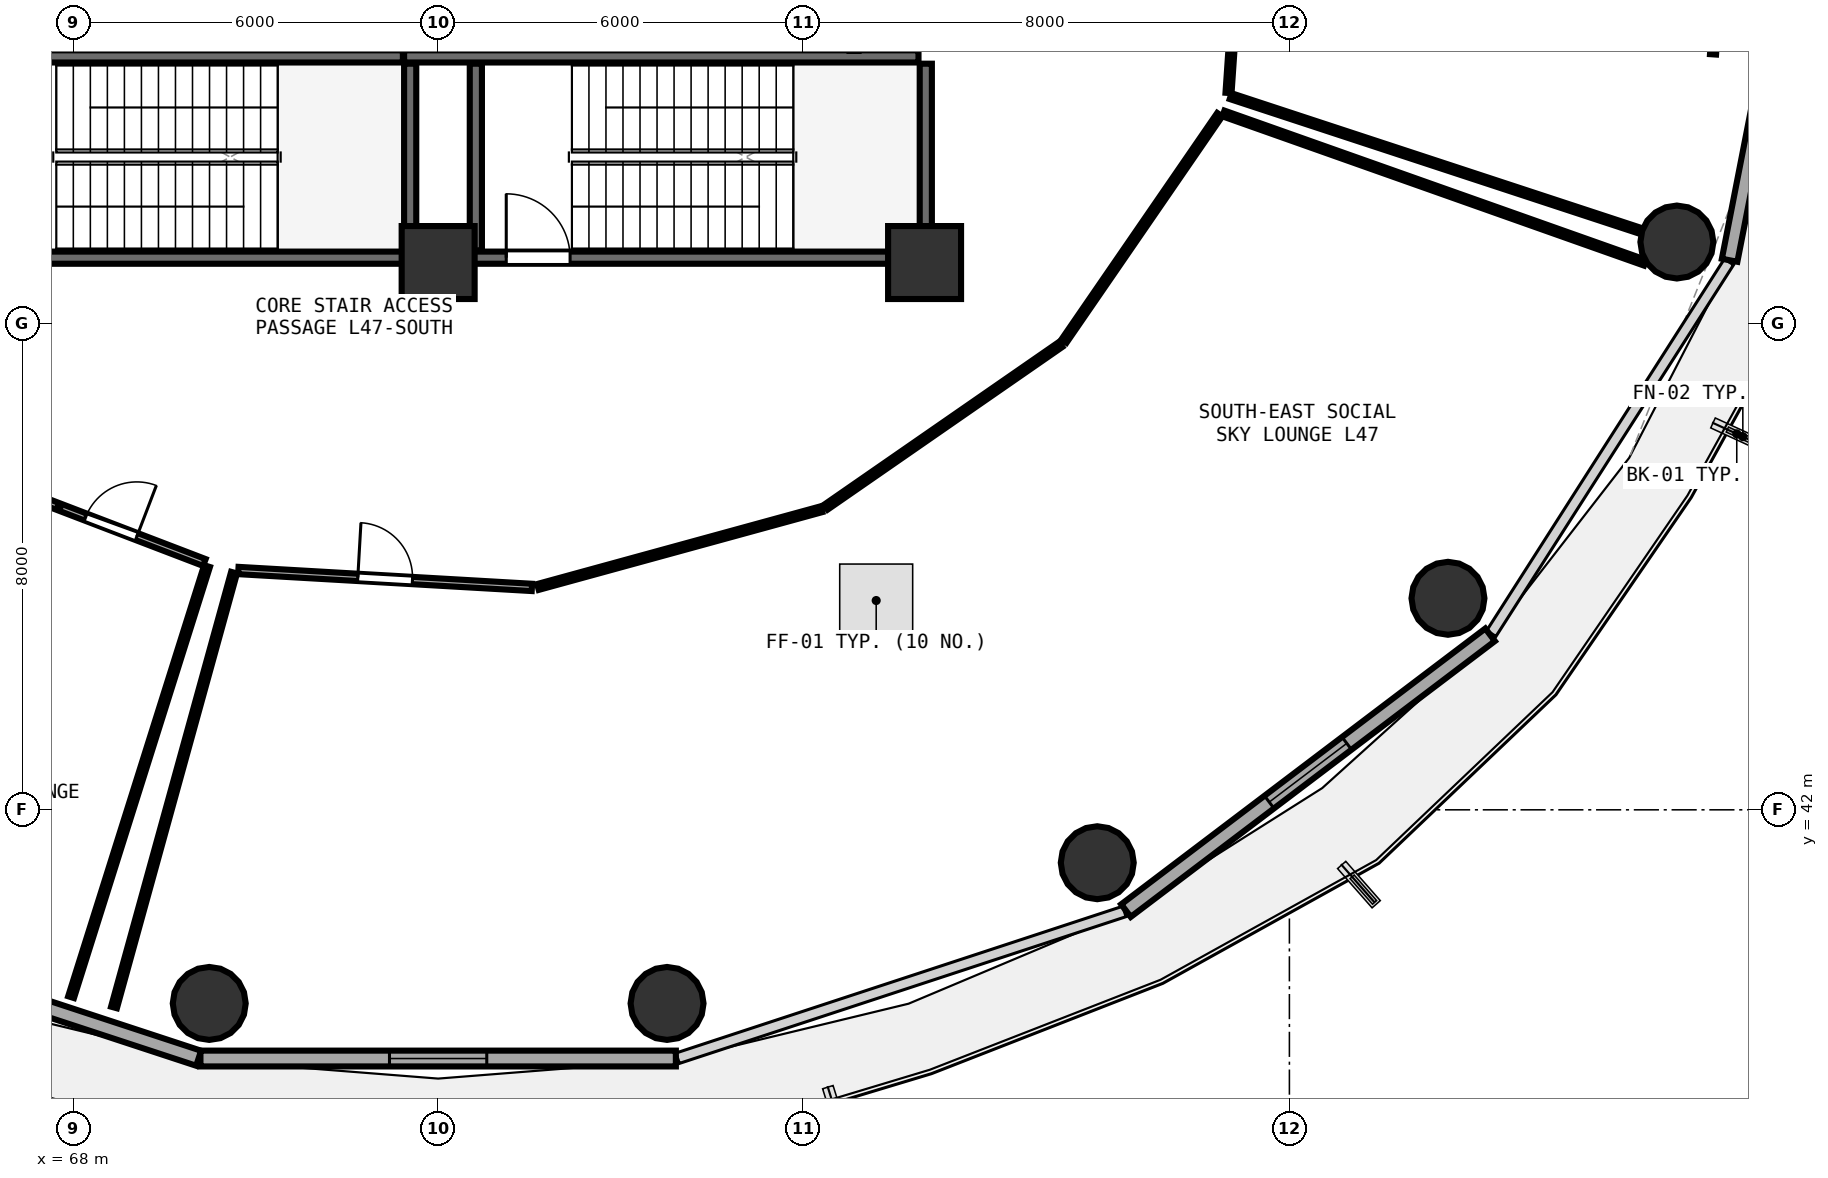
"""IFC4 building model, lengths in metres.
Left out: names, types, materials, properties, quantities, classifications, styles, units other than length and angle.
Written with IfcOpenShell. Run it as: python <this file> out.ifc"""

import sys

from ifc_helpers import new_model, si_unit, direction, frame, frame_2d, origin, origin_2d, place, context, subcontext, project, spatial, rectangle, circle, extrude, element, fill, save


model = new_model("IFC4")
c1 = context("Model", 3, precision=1e-05, world=origin(), true_north=direction((0.0, 1.0)))
c2 = subcontext(c1, "Body", "Model", "MODEL_VIEW")
j1 = project(units=[si_unit("LENGTHUNIT", "METRE"), si_unit("PLANEANGLEUNIT", "RADIAN")], contexts=[c1])
p1 = place(None, origin())
s1 = spatial("IfcSite", under=j1, at=p1, CompositionType="ELEMENT")
p2 = place(p1, origin())
s2 = spatial("IfcBuilding", under=s1, at=p2, CompositionType="ELEMENT")
p3 = place(p2, frame((0.0, 0.0, 184.35)))
s3 = spatial("IfcBuildingStorey", under=s2, at=p3, CompositionType="ELEMENT", Elevation=184.35)
for number, where, z_axis, x_axis in (
    (1, (74.0, 51.0, 0.0), (0.0, 0.0, 1.0), (1.0, 0.0, 0.0)),
    (2, (82.0, 51.0, 0.0), (0.0, 0.0, 1.0), (1.0, 0.0, 0.0)),
):
    element("IfcColumn", number, at=place(p3, frame(where, z_axis=z_axis, x_axis=x_axis)), inside=s3, PredefinedType="PILASTER", context=c2, shape_type="SweptSolid", body=[
        extrude(rectangle(XDim=1.2, YDim=1.2, at=origin_2d()), origin(), (0.0, 0.0, 1.0), 4.76),
    ])
for number, where, z_axis, x_axis in (
    (3, (70.235, 38.816, 0.0), (0.0, 0.0, 1.0), (1.0, 0.0, 0.0)),
    (4, (77.765, 38.816, 0.0), (0.0, 0.0, 1.0), (1.0, 0.0, 0.0)),
    (5, (84.84, 41.13, 0.0), (0.0, 0.0, 1.0), (1.0, 0.0, 0.0)),
    (6, (90.608, 45.479, 0.0), (0.0, 0.0, 1.0), (1.0, 0.0, 0.0)),
    (7, (94.373, 51.337, 0.0), (0.0, 0.0, 1.0), (1.0, 0.0, 0.0)),
):
    element("IfcColumn", number, at=place(p3, frame(where, z_axis=z_axis, x_axis=x_axis)), inside=s3, PredefinedType="COLUMN", context=c2, shape_type="SweptSolid", body=[
        extrude(circle(Radius=0.6, at=origin_2d()), origin(), (0.0, 0.0, 1.0), 4.76),
    ])
p4 = place(p3, frame((62.714, 40.328, 0.0), z_axis=(0.0, 0.0, 1.0), x_axis=(0.950038302428, -0.312133343173, 0.0)))
e8 = element("IfcWall", 8, at=p4, inside=s3, PredefinedType="SOLIDWALL", context=c2, shape_type="SweptSolid", body=[
    extrude(rectangle(XDim=7.733, YDim=0.26, at=frame_2d((3.867, 0.0))), origin(), (0.0, 0.0, 1.0), 4.345),
])
p5 = place(p4, frame((3.067, 0.0, 0.85)))
e9 = element("IfcOpeningElement", 9, at=p5, cuts=e8, PredefinedType="OPENING", context=c2, shape_type="SweptSolid", body=[
    extrude(rectangle(XDim=1.6, YDim=1.45, at=frame_2d((0.8, 0.725))), frame((0.0, 0.14, 0.0), z_axis=(0.0, -1.0, 0.0), x_axis=(1.0, 0.0, 0.0)), (0.0, 0.0, 1.0), 0.28),
])
p6 = place(p3, frame((70.091, 37.91, 0.0), z_axis=(0.0, 0.0, 1.0), x_axis=(1.0, 0.0, 0.0)))
e10 = element("IfcWall", 10, at=p6, inside=s3, PredefinedType="SOLIDWALL", context=c2, shape_type="SweptSolid", body=[
    extrude(rectangle(XDim=7.819, YDim=0.26, at=frame_2d((3.909, 0.0))), origin(), (0.0, 0.0, 1.0), 4.345),
])
p7 = place(p6, frame((3.109, 0.0, 0.85)))
e11 = element("IfcOpeningElement", 11, at=p7, cuts=e10, PredefinedType="OPENING", context=c2, shape_type="SweptSolid", body=[
    extrude(rectangle(XDim=1.6, YDim=1.45, at=frame_2d((0.8, 0.725))), frame((0.0, 0.14, 0.0), z_axis=(0.0, -1.0, 0.0), x_axis=(1.0, 0.0, 0.0)), (0.0, 0.0, 1.0), 0.28),
])
p8 = place(p3, frame((85.312, 40.342, 0.0), z_axis=(0.0, 0.0, 1.0), x_axis=(0.797163719609, 0.603763202042, 0.0)))
e12 = element("IfcWall", 12, at=p8, inside=s3, PredefinedType="SOLIDWALL", context=c2, shape_type="SweptSolid", body=[
    extrude(rectangle(XDim=7.512, YDim=0.26, at=frame_2d((3.756, 0.0))), origin(), (0.0, 0.0, 1.0), 4.345),
])
p9 = place(p8, frame((2.956, 0.0, 0.85)))
e13 = element("IfcOpeningElement", 13, at=p9, cuts=e12, PredefinedType="OPENING", context=c2, shape_type="SweptSolid", body=[
    extrude(rectangle(XDim=1.6, YDim=1.45, at=frame_2d((0.8, 0.725))), frame((0.0, 0.14, 0.0), z_axis=(0.0, -1.0, 0.0), x_axis=(1.0, 0.0, 0.0)), (0.0, 0.0, 1.0), 0.28),
])
p10 = place(p3, frame((95.24, 51.038, 0.0), z_axis=(0.0, 0.0, 1.0), x_axis=(0.191716984769, 0.981450252306, 0.0)))
e14 = element("IfcWall", 14, at=p10, inside=s3, PredefinedType="SOLIDWALL", context=c2, shape_type="SweptSolid", body=[
    extrude(rectangle(XDim=7.079, YDim=0.26, at=frame_2d((3.54, 0.0))), origin(), (0.0, 0.0, 1.0), 4.345),
])
p11 = place(p10, frame((2.74, 0.0, 0.85)))
e15 = element("IfcOpeningElement", 15, at=p11, cuts=e14, PredefinedType="OPENING", context=c2, shape_type="SweptSolid", body=[
    extrude(rectangle(XDim=1.6, YDim=1.45, at=frame_2d((0.8, 0.725))), frame((0.0, 0.14, 0.0), z_axis=(0.0, -1.0, 0.0), x_axis=(1.0, 0.0, 0.0)), (0.0, 0.0, 1.0), 0.28),
])
p12 = place(p3, frame((74.0, 51.08, 0.0), z_axis=(0.0, 0.0, 1.0), x_axis=(1.0, 0.0, 0.0)))
e16 = element("IfcWall", 16, at=p12, inside=s3, PredefinedType="SHEAR", context=c2, shape_type="SweptSolid", body=[
    extrude(rectangle(XDim=7.9, YDim=0.2, at=frame_2d((3.95, 0.0))), origin(), (0.0, 0.0, 1.0), 4.36),
])
p13 = place(p12, frame((1.12, 0.0, 0.0)))
e17 = element("IfcOpeningElement", 17, at=p13, cuts=e16, PredefinedType="OPENING", context=c2, shape_type="SweptSolid", body=[
    extrude(rectangle(XDim=1.05, YDim=2.1, at=frame_2d((0.525, 1.05))), frame((0.0, 0.11, 0.0), z_axis=(0.0, -1.0, 0.0), x_axis=(1.0, 0.0, 0.0)), (0.0, 0.0, 1.0), 0.22),
])
p14 = place(p3, frame((82.02, 51.2, 0.0), z_axis=(0.0, 0.0, 1.0), x_axis=(0.0, 1.0, 0.0)))
e18 = element("IfcWall", 18, at=p14, inside=s3, PredefinedType="SHEAR", context=c2, shape_type="SweptSolid", body=[
    extrude(rectangle(XDim=3.07, YDim=0.2, at=frame_2d((1.535, 0.0))), origin(), (0.0, 0.0, 1.0), 4.36),
])
p15 = place(p3, frame((81.9, 54.39, 0.0), z_axis=(0.0, 0.0, 1.0), x_axis=(-1.0, 0.0, 0.0)))
e19 = element("IfcWall", 19, at=p15, inside=s3, PredefinedType="SHEAR", context=c2, shape_type="SweptSolid", body=[
    extrude(rectangle(XDim=8.46, YDim=0.2, at=frame_2d((4.23, 0.0))), origin(), (0.0, 0.0, 1.0), 4.36),
])
p16 = place(p3, frame((74.62, 54.27, 0.0), z_axis=(0.0, 0.0, 1.0), x_axis=(0.0, -1.0, 0.0)))
e20 = element("IfcWall", 20, at=p16, inside=s3, PredefinedType="SHEAR", context=c2, shape_type="SweptSolid", body=[
    extrude(rectangle(XDim=3.07, YDim=0.2, at=frame_2d((1.535, 0.0))), origin(), (0.0, 0.0, 1.0), 4.36),
])
p17 = place(p3, frame((66.26, 51.08, 0.0), z_axis=(0.0, 0.0, 1.0), x_axis=(1.0, 0.0, 0.0)))
e21 = element("IfcWall", 21, at=p17, inside=s3, PredefinedType="SHEAR", context=c2, shape_type="SweptSolid", body=[
    extrude(rectangle(XDim=7.16, YDim=0.2, at=frame_2d((3.58, 0.0))), origin(), (0.0, 0.0, 1.0), 4.36),
])
p18 = place(p3, frame((73.54, 51.2, 0.0), z_axis=(0.0, 0.0, 1.0), x_axis=(0.0, 1.0, 0.0)))
e22 = element("IfcWall", 22, at=p18, inside=s3, PredefinedType="SHEAR", context=c2, shape_type="SweptSolid", body=[
    extrude(rectangle(XDim=3.07, YDim=0.2, at=frame_2d((1.535, 0.0))), origin(), (0.0, 0.0, 1.0), 4.36),
])
p19 = place(p3, frame((73.42, 54.39, 0.0), z_axis=(0.0, 0.0, 1.0), x_axis=(-1.0, 0.0, 0.0)))
e23 = element("IfcWall", 23, at=p19, inside=s3, PredefinedType="SHEAR", context=c2, shape_type="SweptSolid", body=[
    extrude(rectangle(XDim=7.16, YDim=0.2, at=frame_2d((3.58, 0.0))), origin(), (0.0, 0.0, 1.0), 4.36),
])
p20 = place(p3, frame((70.714, 45.936, 0.0), z_axis=(0.0, 0.0, 1.0), x_axis=(0.998345519296, -0.057499774802, 0.0)))
e24 = element("IfcWall", 24, at=p20, inside=s3, PredefinedType="PARTITIONING", context=c2, shape_type="SweptSolid", body=[
    extrude(rectangle(XDim=4.836, YDim=0.12, at=frame_2d((2.418, 0.0))), origin(), (0.0, 0.0, 1.0), 2.345),
])
p21 = place(p20, frame((1.968, 0.0, 0.0)))
e25 = element("IfcOpeningElement", 25, at=p21, cuts=e24, PredefinedType="OPENING", context=c2, shape_type="SweptSolid", body=[
    extrude(rectangle(XDim=0.9, YDim=2.08, at=frame_2d((0.45, 1.04))), frame((0.0, 0.07, 0.0), z_axis=(0.0, -1.0, 0.0), x_axis=(1.0, 0.0, 0.0)), (0.0, 0.0, 1.0), 0.14),
])
p22 = place(p3, frame((67.092, 47.24, 0.0), z_axis=(0.0, 0.0, 1.0), x_axis=(0.93395246748, -0.35739724186, 0.0)))
e26 = element("IfcWall", 26, at=p22, inside=s3, PredefinedType="PARTITIONING", context=c2, shape_type="SweptSolid", body=[
    extrude(rectangle(XDim=3.28, YDim=0.12, at=frame_2d((1.64, 0.0))), origin(), (0.0, 0.0, 1.0), 4.105),
])
p23 = place(p22, frame((1.19, 0.0, 0.0)))
e27 = element("IfcOpeningElement", 27, at=p23, cuts=e26, PredefinedType="OPENING", context=c2, shape_type="SweptSolid", body=[
    extrude(rectangle(XDim=0.9, YDim=2.08, at=frame_2d((0.45, 1.04))), frame((0.0, 0.07, 0.0), z_axis=(0.0, -1.0, 0.0), x_axis=(1.0, 0.0, 0.0)), (0.0, 0.0, 1.0), 0.14),
])
p24 = place(p3, frame((75.641, 45.665, 0.0), z_axis=(0.0, 0.0, 1.0), x_axis=(0.964402925862, 0.264437131637, 0.0)))
e28 = element("IfcWall", 28, at=p24, inside=s3, PredefinedType="PARTITIONING", context=c2, shape_type="SweptSolid", body=[
    extrude(rectangle(XDim=4.836, YDim=0.1, at=frame_2d((2.418, 0.0))), origin(), (0.0, 0.0, 1.0), 2.345),
])
p25 = place(p3, frame((80.376, 46.977, 0.0), z_axis=(0.0, 0.0, 1.0), x_axis=(0.821969471946, 0.569531550653, 0.0)))
e29 = element("IfcWall", 29, at=p25, inside=s3, PredefinedType="PARTITIONING", context=c2, shape_type="SweptSolid", body=[
    extrude(rectangle(XDim=4.697, YDim=0.1, at=frame_2d((2.349, 0.0))), origin(), (0.0, 0.0, 1.0), 2.345),
])
p26 = place(p3, frame((84.293, 49.708, 0.0), z_axis=(0.0, 0.0, 1.0), x_axis=(0.566732833033, 0.823901630028, 0.0)))
e30 = element("IfcWall", 30, at=p26, inside=s3, PredefinedType="PARTITIONING", context=c2, shape_type="SweptSolid", body=[
    extrude(rectangle(XDim=4.52, YDim=0.1, at=frame_2d((2.26, 0.0))), origin(), (0.0, 0.0, 1.0), 2.345),
])
p27 = place(p3, frame((86.915, 53.452, 0.0), z_axis=(0.0, 0.0, 1.0), x_axis=(0.942679225918, -0.333700280226, 0.0)))
e31 = element("IfcWall", 31, at=p27, inside=s3, PredefinedType="PARTITIONING", context=c2, shape_type="SweptSolid", body=[
    extrude(rectangle(XDim=7.355, YDim=0.1, at=frame_2d((3.677, 0.0))), origin(), (0.0, 0.0, 1.0), 2.345),
])
p28 = place(p3, frame((68.669, 38.75, 0.0), z_axis=(0.0, 0.0, 1.0), x_axis=(0.26617364863, 0.963925095002, 0.0)))
e32 = element("IfcWall", 32, at=p28, inside=s3, PredefinedType="PARTITIONING", context=c2, shape_type="SweptSolid", body=[
    extrude(rectangle(XDim=7.418, YDim=0.1, at=frame_2d((3.709, 0.0))), origin(), (0.0, 0.0, 1.0), 3.895),
])
p29 = place(p3, frame((86.999, 53.789, 0.0), z_axis=(0.0, 0.0, 1.0), x_axis=(0.06796220027, 0.997687896757, 0.0)))
e33 = element("IfcWall", 33, at=p29, inside=s3, PredefinedType="PARTITIONING", context=c2, shape_type="SweptSolid", body=[
    extrude(rectangle(XDim=6.983, YDim=0.1, at=frame_2d((3.492, 0.0))), origin(), (0.0, 0.0, 1.0), 2.345),
])
p30 = place(p3, frame((95.184, 57.619, 0.0), z_axis=(0.0, 0.0, 1.0), x_axis=(-0.06775835494, -0.997701761718, 0.0)))
e34 = element("IfcWall", 34, at=p30, inside=s3, PredefinedType="PARTITIONING", context=c2, shape_type="SweptSolid", body=[
    extrude(rectangle(XDim=3.203, YDim=0.1, at=frame_2d((1.602, 0.0))), origin(), (0.0, 0.0, 1.0), 2.345),
])
p31 = place(p3, frame((93.775, 51.521, 0.0), z_axis=(0.0, 0.0, 1.0), x_axis=(-0.949992823036, 0.312271734521, 0.0)))
e35 = element("IfcWall", 35, at=p31, inside=s3, PredefinedType="PARTITIONING", context=c2, shape_type="SweptSolid", body=[
    extrude(rectangle(XDim=7.096, YDim=0.1, at=frame_2d((3.548, 0.0))), origin(), (0.0, 0.0, 1.0), 2.345),
])
p32 = place(p3, frame((70.199, 46.008, 0.0), z_axis=(0.0, 0.0, 1.0), x_axis=(-0.300834252316, -0.953676440222, 0.0)))
e36 = element("IfcWall", 36, at=p32, inside=s3, PredefinedType="PARTITIONING", context=c2, shape_type="SweptSolid", body=[
    extrude(rectangle(XDim=7.433, YDim=0.1, at=frame_2d((3.716, 0.0))), origin(), (0.0, 0.0, 1.0), 3.895),
])
p33 = place(p7, origin())
e37 = element("IfcWindow", 37, at=p33, inside=s3, PartitioningType="SINGLE_PANEL", PredefinedType="WINDOW", context=c2, shape_type="SweptSolid", body=[
    extrude(rectangle(XDim=1.6, YDim=1.45, at=frame_2d((0.8, 0.725))), frame((0.0, 0.03, 0.0), z_axis=(0.0, -1.0, 0.0), x_axis=(1.0, 0.0, 0.0)), (0.0, 0.0, 1.0), 0.06),
])
fill(e11, e37)
p34 = place(p9, origin())
e38 = element("IfcWindow", 38, at=p34, inside=s3, PartitioningType="SINGLE_PANEL", PredefinedType="WINDOW", context=c2, shape_type="SweptSolid", body=[
    extrude(rectangle(XDim=1.6, YDim=1.45, at=frame_2d((0.8, 0.725))), frame((0.0, 0.03, 0.0), z_axis=(0.0, -1.0, 0.0), x_axis=(1.0, 0.0, 0.0)), (0.0, 0.0, 1.0), 0.06),
])
fill(e13, e38)
p35 = place(p13, origin())
e39 = element("IfcDoor", 39, at=p35, inside=s3, OperationType="SINGLE_SWING_LEFT", PredefinedType="DOOR", context=c2, shape_type="SweptSolid", body=[
    extrude(rectangle(XDim=1.05, YDim=2.1, at=frame_2d((0.525, 1.05))), frame((0.0, 0.025, 0.0), z_axis=(0.0, -1.0, 0.0), x_axis=(1.0, 0.0, 0.0)), (0.0, 0.0, 1.0), 0.05),
])
fill(e17, e39)
p36 = place(p21, origin())
e40 = element("IfcDoor", 40, at=p36, inside=s3, OperationType="SINGLE_SWING_LEFT", PredefinedType="DOOR", context=c2, shape_type="SweptSolid", body=[
    extrude(rectangle(XDim=0.9, YDim=2.08, at=frame_2d((0.45, 1.04))), frame((0.0, 0.025, 0.0), z_axis=(0.0, -1.0, 0.0), x_axis=(1.0, 0.0, 0.0)), (0.0, 0.0, 1.0), 0.05),
])
fill(e25, e40)
p37 = place(p23, origin())
e41 = element("IfcDoor", 41, at=p37, inside=s3, OperationType="SINGLE_SWING_RIGHT", PredefinedType="DOOR", context=c2, shape_type="SweptSolid", body=[
    extrude(rectangle(XDim=0.9, YDim=2.08, at=frame_2d((0.45, 1.04))), frame((0.0, 0.025, 0.0), z_axis=(0.0, -1.0, 0.0), x_axis=(1.0, 0.0, 0.0)), (0.0, 0.0, 1.0), 0.05),
])
fill(e27, e41)
save(model, sys.argv[1])
